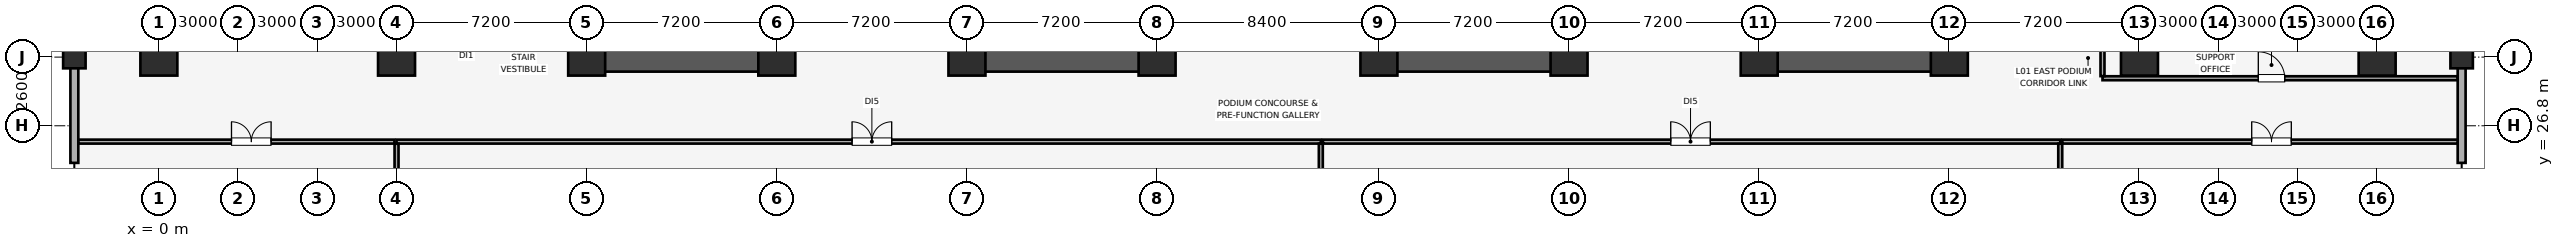
"""IFC4 building model, lengths in metres.
Left out: names, types, materials, properties, quantities, classifications, styles, units other than length and angle.
Written with IfcOpenShell. Run it as: python <this file> out.ifc"""

import sys

from ifc_helpers import new_model, si_unit, direction, frame, frame_2d, origin, origin_2d, place, context, subcontext, project, spatial, rectangle, extrude, element, fill, save


model = new_model("IFC4")
c1 = context("Model", 3, precision=1e-05, world=origin(), true_north=direction((0.0, 1.0)))
c2 = subcontext(c1, "Body", "Model", "MODEL_VIEW")
j1 = project(units=[si_unit("LENGTHUNIT", "METRE"), si_unit("PLANEANGLEUNIT", "RADIAN")], contexts=[c1])
p1 = place(None, origin())
s1 = spatial("IfcSite", under=j1, at=p1, CompositionType="ELEMENT")
p2 = place(p1, origin())
s2 = spatial("IfcBuilding", under=s1, at=p2, CompositionType="ELEMENT")
p3 = place(p2, frame((0.0, 0.0, 8.0)))
s3 = spatial("IfcBuildingStorey", under=s2, at=p3, CompositionType="ELEMENT", Elevation=8.0)
for number, where, z_axis, x_axis in (
    (1, (-3.2, 29.4, 0.0), (0.0, 0.0, 1.0), (1.0, 0.0, 0.0)),
    (2, (87.2, 29.4, 0.0), (0.0, 0.0, 1.0), (1.0, 0.0, 0.0)),
):
    element("IfcColumn", number, at=place(p3, frame(where, z_axis=z_axis, x_axis=x_axis)), inside=s3, PredefinedType="COLUMN", context=c2, shape_type="SweptSolid", body=[
        extrude(rectangle(XDim=0.85, YDim=0.85, at=origin_2d()), origin(), (0.0, 0.0, 1.0), 5.68),
    ])
for number, where, z_axis, x_axis in (
    (3, (9.0, 29.4, 0.0), (0.0, 0.0, 1.0), (1.0, 0.0, 0.0)),
    (4, (16.2, 29.4, 0.0), (0.0, 0.0, 1.0), (1.0, 0.0, 0.0)),
    (5, (23.4, 29.4, 0.0), (0.0, 0.0, 1.0), (1.0, 0.0, 0.0)),
    (6, (30.6, 29.4, 0.0), (0.0, 0.0, 1.0), (1.0, 0.0, 0.0)),
    (7, (37.8, 29.4, 0.0), (0.0, 0.0, 1.0), (1.0, 0.0, 0.0)),
    (8, (46.2, 29.4, 0.0), (0.0, 0.0, 1.0), (1.0, 0.0, 0.0)),
    (9, (53.4, 29.4, 0.0), (0.0, 0.0, 1.0), (1.0, 0.0, 0.0)),
    (10, (60.6, 29.4, 0.0), (0.0, 0.0, 1.0), (1.0, 0.0, 0.0)),
    (11, (67.8, 29.4, 0.0), (0.0, 0.0, 1.0), (1.0, 0.0, 0.0)),
    (12, (75.0, 29.4, 0.0), (0.0, 0.0, 1.0), (1.0, 0.0, 0.0)),
    (13, (0.0, 29.4, 0.0), (0.0, 0.0, 1.0), (1.0, 0.0, 0.0)),
    (14, (84.0, 29.4, 0.0), (0.0, 0.0, 1.0), (1.0, 0.0, 0.0)),
):
    element("IfcColumn", number, at=place(p3, frame(where, z_axis=z_axis, x_axis=x_axis)), inside=s3, PredefinedType="COLUMN", context=c2, shape_type="SweptSolid", body=[
        extrude(rectangle(XDim=1.4, YDim=1.4, at=origin_2d()), origin(), (0.0, 0.0, 1.0), 5.68),
    ])
p4 = place(p3, frame((87.2, 25.395, 0.0), z_axis=(0.0, 0.0, 1.0), x_axis=(0.0, 1.0, 0.0)))
e15 = element("IfcWall", 15, at=p4, inside=s3, PredefinedType="SOLIDWALL", context=c2, shape_type="SweptSolid", body=[
    extrude(rectangle(XDim=23.505, YDim=0.3, at=frame_2d((11.752, 0.0))), origin(), (0.0, 0.0, 1.0), 4.73),
])
p5 = place(p4, frame((7.605, 0.0, 0.85)))
e16 = element("IfcOpeningElement", 16, at=p5, cuts=e15, PredefinedType="OPENING", context=c2, shape_type="SweptSolid", body=[
    extrude(rectangle(XDim=3.8, YDim=2.2, at=frame_2d((1.9, 1.1))), frame((0.0, 0.16, 0.0), z_axis=(0.0, -1.0, 0.0), x_axis=(1.0, 0.0, 0.0)), (0.0, 0.0, 1.0), 0.32),
])
p6 = place(p4, frame((15.505, 0.0, 0.85)))
e17 = element("IfcOpeningElement", 17, at=p6, cuts=e15, PredefinedType="OPENING", context=c2, shape_type="SweptSolid", body=[
    extrude(rectangle(XDim=3.8, YDim=2.2, at=frame_2d((1.9, 1.1))), frame((0.0, 0.16, 0.0), z_axis=(0.0, -1.0, 0.0), x_axis=(1.0, 0.0, 0.0)), (0.0, 0.0, 1.0), 0.32),
])
p7 = place(p3, frame((-3.2, 48.9, 0.0), z_axis=(0.0, 0.0, 1.0), x_axis=(0.0, -1.0, 0.0)))
e18 = element("IfcWall", 18, at=p7, inside=s3, PredefinedType="SOLIDWALL", context=c2, shape_type="SweptSolid", body=[
    extrude(rectangle(XDim=23.505, YDim=0.3, at=frame_2d((11.752, 0.0))), origin(), (0.0, 0.0, 1.0), 4.73),
])
p8 = place(p7, frame((12.5, 0.0, 0.85)))
e19 = element("IfcOpeningElement", 19, at=p8, cuts=e18, PredefinedType="OPENING", context=c2, shape_type="SweptSolid", body=[
    extrude(rectangle(XDim=3.8, YDim=2.2, at=frame_2d((1.9, 1.1))), frame((0.0, 0.16, 0.0), z_axis=(0.0, -1.0, 0.0), x_axis=(1.0, 0.0, 0.0)), (0.0, 0.0, 1.0), 0.32),
])
p9 = place(p7, frame((4.2, 0.0, 0.85)))
e20 = element("IfcOpeningElement", 20, at=p9, cuts=e18, PredefinedType="OPENING", context=c2, shape_type="SweptSolid", body=[
    extrude(rectangle(XDim=3.8, YDim=2.2, at=frame_2d((1.9, 1.1))), frame((0.0, 0.16, 0.0), z_axis=(0.0, -1.0, 0.0), x_axis=(1.0, 0.0, 0.0)), (0.0, 0.0, 1.0), 0.32),
])
for number, where, z_axis, x_axis in (
    (21, (16.2, 29.4, 0.0), (0.0, 0.0, 1.0), (0.0, 1.0, 0.0)),
    (22, (67.8, 29.4, 0.0), (0.0, 0.0, 1.0), (0.0, 1.0, 0.0)),
):
    element("IfcWall", number, at=place(p3, frame(where, z_axis=z_axis, x_axis=x_axis)), inside=s3, PredefinedType="SHEAR", context=c2, shape_type="SweptSolid", body=[
        extrude(rectangle(XDim=19.2, YDim=1.1, at=frame_2d((9.6, 0.0))), origin(), (0.0, 0.0, 1.0), 5.68),
    ])
p10 = place(p3, frame((16.755, 29.4, 0.0), z_axis=(0.0, 0.0, 1.0), x_axis=(1.0, 0.0, 0.0)))
e23 = element("IfcWall", 23, at=p10, inside=s3, PredefinedType="SHEAR", context=c2, shape_type="SweptSolid", body=[
    extrude(rectangle(XDim=6.845, YDim=1.1, at=frame_2d((3.423, 0.0))), origin(), (0.0, 0.0, 1.0), 5.68),
])
for number, where, z_axis, x_axis in (
    (24, (30.4, 29.4, 0.0), (0.0, 0.0, 1.0), (1.0, 0.0, 0.0)),
    (25, (46.0, 29.4, 0.0), (0.0, 0.0, 1.0), (1.0, 0.0, 0.0)),
):
    element("IfcWall", number, at=place(p3, frame(where, z_axis=z_axis, x_axis=x_axis)), inside=s3, PredefinedType="SHEAR", context=c2, shape_type="SweptSolid", body=[
        extrude(rectangle(XDim=7.6, YDim=1.1, at=frame_2d((3.8, 0.0))), origin(), (0.0, 0.0, 1.0), 5.68),
    ])
p11 = place(p3, frame((60.4, 29.4, 0.0), z_axis=(0.0, 0.0, 1.0), x_axis=(1.0, 0.0, 0.0)))
e26 = element("IfcWall", 26, at=p11, inside=s3, PredefinedType="SHEAR", context=c2, shape_type="SweptSolid", body=[
    extrude(rectangle(XDim=6.845, YDim=1.1, at=frame_2d((3.423, 0.0))), origin(), (0.0, 0.0, 1.0), 5.68),
])
p12 = place(p3, frame((73.6, 28.6, 0.0), z_axis=(0.0, 0.0, 1.0), x_axis=(1.0, 0.0, 0.0)))
e27 = element("IfcWall", 27, at=p12, inside=s3, PredefinedType="PARTITIONING", context=c2, shape_type="SweptSolid", body=[
    extrude(rectangle(XDim=13.445, YDim=0.15, at=frame_2d((6.722, 0.0))), origin(), (0.0, 0.0, 1.0), 5.68),
])
p13 = place(p12, frame((5.9, 0.0, 0.0)))
e28 = element("IfcOpeningElement", 28, at=p13, cuts=e27, PredefinedType="OPENING", context=c2, shape_type="SweptSolid", body=[
    extrude(rectangle(XDim=1.0, YDim=2.15, at=frame_2d((0.5, 1.075))), frame((0.0, 0.085, 0.0), z_axis=(0.0, -1.0, 0.0), x_axis=(1.0, 0.0, 0.0)), (0.0, 0.0, 1.0), 0.17),
])
p14 = place(p3, frame((73.6, 28.68, 0.0), z_axis=(0.0, 0.0, 1.0), x_axis=(0.0, 1.0, 0.0)))
e29 = element("IfcWall", 29, at=p14, inside=s3, PredefinedType="PARTITIONING", context=c2, shape_type="SweptSolid", body=[
    extrude(rectangle(XDim=1.84, YDim=0.15, at=frame_2d((0.92, 0.0))), origin(), (0.0, 0.0, 1.0), 5.68),
])
p15 = place(p3, frame((9.0, 26.2, 0.0), z_axis=(0.0, 0.0, 1.0), x_axis=(1.0, 0.0, 0.0)))
e30 = element("IfcWall", 30, at=p15, inside=s3, PredefinedType="PARTITIONING", context=c2, shape_type="SweptSolid", body=[
    extrude(rectangle(XDim=35.0, YDim=0.15, at=frame_2d((17.5, 0.0))), origin(), (0.0, 0.0, 1.0), 5.68),
])
p16 = place(p15, frame((17.25, 0.0, 0.0)))
e31 = element("IfcOpeningElement", 31, at=p16, cuts=e30, PredefinedType="OPENING", context=c2, shape_type="SweptSolid", body=[
    extrude(rectangle(XDim=1.5, YDim=2.25, at=frame_2d((0.75, 1.125))), frame((0.0, 0.085, 0.0), z_axis=(0.0, -1.0, 0.0), x_axis=(1.0, 0.0, 0.0)), (0.0, 0.0, 1.0), 0.17),
])
p17 = place(p3, frame((9.0, -2.345, 0.0), z_axis=(0.0, 0.0, 1.0), x_axis=(0.0, 1.0, 0.0)))
e32 = element("IfcWall", 32, at=p17, inside=s3, PredefinedType="PARTITIONING", context=c2, shape_type="SweptSolid", body=[
    extrude(rectangle(XDim=28.465, YDim=0.15, at=frame_2d((14.232, 0.0))), origin(), (0.0, 0.0, 1.0), 4.992),
])
p18 = place(p3, frame((44.0, -2.345, 0.0), z_axis=(0.0, 0.0, 1.0), x_axis=(0.0, 1.0, 0.0)))
e33 = element("IfcWall", 33, at=p18, inside=s3, PredefinedType="PARTITIONING", context=c2, shape_type="SweptSolid", body=[
    extrude(rectangle(XDim=28.465, YDim=0.15, at=frame_2d((14.232, 0.0))), origin(), (0.0, 0.0, 1.0), 5.68),
])
p19 = place(p3, frame((44.08, 26.2, 0.0), z_axis=(0.0, 0.0, 1.0), x_axis=(1.0, 0.0, 0.0)))
e34 = element("IfcWall", 34, at=p19, inside=s3, PredefinedType="PARTITIONING", context=c2, shape_type="SweptSolid", body=[
    extrude(rectangle(XDim=27.92, YDim=0.15, at=frame_2d((13.96, 0.0))), origin(), (0.0, 0.0, 1.0), 5.68),
])
p20 = place(p19, frame((13.17, 0.0, 0.0)))
e35 = element("IfcOpeningElement", 35, at=p20, cuts=e34, PredefinedType="OPENING", context=c2, shape_type="SweptSolid", body=[
    extrude(rectangle(XDim=1.5, YDim=2.25, at=frame_2d((0.75, 1.125))), frame((0.0, 0.085, 0.0), z_axis=(0.0, -1.0, 0.0), x_axis=(1.0, 0.0, 0.0)), (0.0, 0.0, 1.0), 0.17),
])
p21 = place(p3, frame((72.0, -2.345, 0.0), z_axis=(0.0, 0.0, 1.0), x_axis=(0.0, 1.0, 0.0)))
e36 = element("IfcWall", 36, at=p21, inside=s3, PredefinedType="PARTITIONING", context=c2, shape_type="SweptSolid", body=[
    extrude(rectangle(XDim=28.465, YDim=0.15, at=frame_2d((14.232, 0.0))), origin(), (0.0, 0.0, 1.0), 5.68),
])
p22 = place(p3, frame((-3.045, 26.2, 0.0), z_axis=(0.0, 0.0, 1.0), x_axis=(1.0, 0.0, 0.0)))
e37 = element("IfcWall", 37, at=p22, inside=s3, PredefinedType="PARTITIONING", context=c2, shape_type="SweptSolid", body=[
    extrude(rectangle(XDim=11.965, YDim=0.15, at=frame_2d((5.982, 0.0))), origin(), (0.0, 0.0, 1.0), 5.68),
])
p23 = place(p22, frame((5.795, 0.0, 0.0)))
e38 = element("IfcOpeningElement", 38, at=p23, cuts=e37, PredefinedType="OPENING", context=c2, shape_type="SweptSolid", body=[
    extrude(rectangle(XDim=1.5, YDim=2.25, at=frame_2d((0.75, 1.125))), frame((0.0, 0.085, 0.0), z_axis=(0.0, -1.0, 0.0), x_axis=(1.0, 0.0, 0.0)), (0.0, 0.0, 1.0), 0.17),
])
p24 = place(p3, frame((72.08, 26.2, 0.0), z_axis=(0.0, 0.0, 1.0), x_axis=(1.0, 0.0, 0.0)))
e39 = element("IfcWall", 39, at=p24, inside=s3, PredefinedType="PARTITIONING", context=c2, shape_type="SweptSolid", body=[
    extrude(rectangle(XDim=14.965, YDim=0.15, at=frame_2d((7.482, 0.0))), origin(), (0.0, 0.0, 1.0), 5.68),
])
p25 = place(p24, frame((7.17, 0.0, 0.0)))
e40 = element("IfcOpeningElement", 40, at=p25, cuts=e39, PredefinedType="OPENING", context=c2, shape_type="SweptSolid", body=[
    extrude(rectangle(XDim=1.5, YDim=2.25, at=frame_2d((0.75, 1.125))), frame((0.0, 0.085, 0.0), z_axis=(0.0, -1.0, 0.0), x_axis=(1.0, 0.0, 0.0)), (0.0, 0.0, 1.0), 0.17),
])
p26 = place(p13, origin())
e41 = element("IfcDoor", 41, at=p26, inside=s3, OperationType="SINGLE_SWING_LEFT", PredefinedType="DOOR", context=c2, shape_type="SweptSolid", body=[
    extrude(rectangle(XDim=1.0, YDim=2.15, at=frame_2d((0.5, 1.075))), frame((0.0, 0.025, 0.0), z_axis=(0.0, -1.0, 0.0), x_axis=(1.0, 0.0, 0.0)), (0.0, 0.0, 1.0), 0.05),
])
fill(e28, e41)
p27 = place(p16, origin())
e42 = element("IfcDoor", 42, at=p27, inside=s3, OperationType="DOUBLE_DOOR_SINGLE_SWING", PredefinedType="DOOR", context=c2, shape_type="SweptSolid", body=[
    extrude(rectangle(XDim=1.5, YDim=2.25, at=frame_2d((0.75, 1.125))), frame((0.0, 0.025, 0.0), z_axis=(0.0, -1.0, 0.0), x_axis=(1.0, 0.0, 0.0)), (0.0, 0.0, 1.0), 0.05),
])
fill(e31, e42)
p28 = place(p20, origin())
e43 = element("IfcDoor", 43, at=p28, inside=s3, OperationType="DOUBLE_DOOR_SINGLE_SWING", PredefinedType="DOOR", context=c2, shape_type="SweptSolid", body=[
    extrude(rectangle(XDim=1.5, YDim=2.25, at=frame_2d((0.75, 1.125))), frame((0.0, 0.025, 0.0), z_axis=(0.0, -1.0, 0.0), x_axis=(1.0, 0.0, 0.0)), (0.0, 0.0, 1.0), 0.05),
])
fill(e35, e43)
p29 = place(p23, origin())
e44 = element("IfcDoor", 44, at=p29, inside=s3, OperationType="DOUBLE_DOOR_SINGLE_SWING", PredefinedType="DOOR", context=c2, shape_type="SweptSolid", body=[
    extrude(rectangle(XDim=1.5, YDim=2.25, at=frame_2d((0.75, 1.125))), frame((0.0, 0.025, 0.0), z_axis=(0.0, -1.0, 0.0), x_axis=(1.0, 0.0, 0.0)), (0.0, 0.0, 1.0), 0.05),
])
fill(e38, e44)
p30 = place(p25, origin())
e45 = element("IfcDoor", 45, at=p30, inside=s3, OperationType="DOUBLE_DOOR_SINGLE_SWING", PredefinedType="DOOR", context=c2, shape_type="SweptSolid", body=[
    extrude(rectangle(XDim=1.5, YDim=2.25, at=frame_2d((0.75, 1.125))), frame((0.0, 0.025, 0.0), z_axis=(0.0, -1.0, 0.0), x_axis=(1.0, 0.0, 0.0)), (0.0, 0.0, 1.0), 0.05),
])
fill(e40, e45)
save(model, sys.argv[1])
